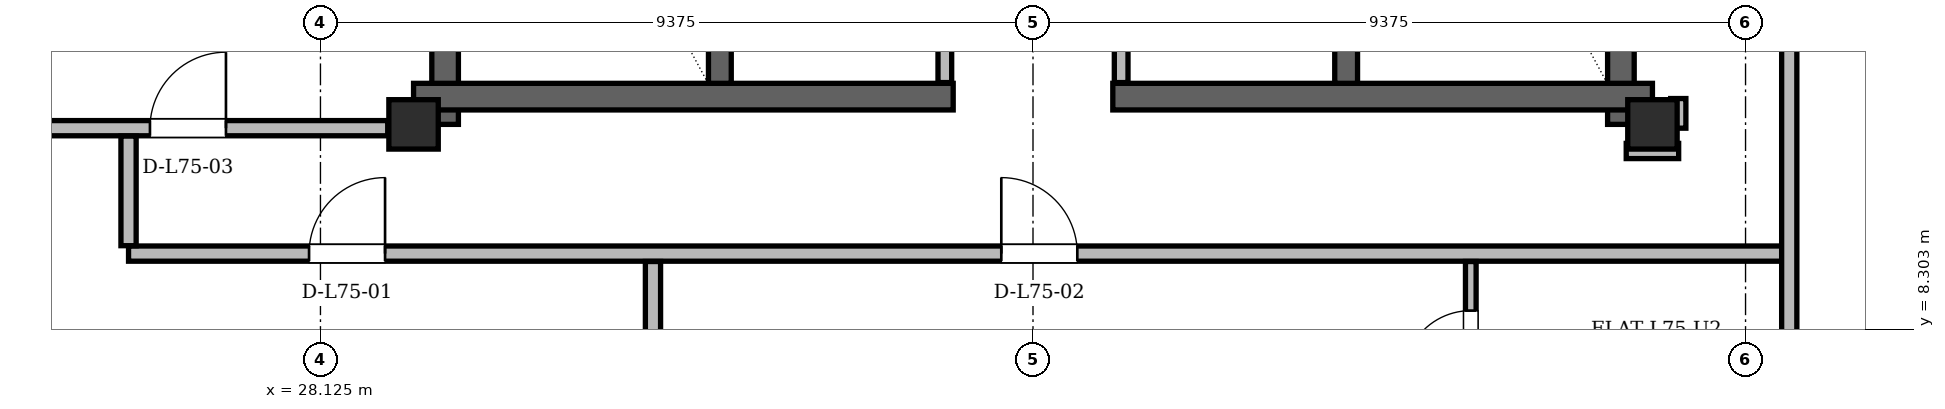
"""IFC4 building model, lengths in metres.
Left out: names, types, materials, properties, quantities, classifications, styles, units other than length and angle.
Written with IfcOpenShell. Run it as: python <this file> out.ifc"""

import sys

from ifc_helpers import new_model, si_unit, direction, frame, frame_2d, origin, origin_2d, place, context, subcontext, project, spatial, rectangle, hollow_rectangle, extrude, element, fill, save


model = new_model("IFC4")
c1 = context("Model", 3, precision=1e-05, world=origin(), true_north=direction((0.0, 1.0)))
c2 = subcontext(c1, "Body", "Model", "MODEL_VIEW")
j1 = project(units=[si_unit("LENGTHUNIT", "METRE"), si_unit("PLANEANGLEUNIT", "RADIAN")], contexts=[c1])
p1 = place(None, origin())
s1 = spatial("IfcSite", under=j1, at=p1, CompositionType="ELEMENT")
p2 = place(p1, origin())
s2 = spatial("IfcBuilding", under=s1, at=p2, CompositionType="ELEMENT")
p3 = place(p2, frame((0.0, 0.0, 285.0)))
s3 = spatial("IfcBuildingStorey", under=s2, at=p3, CompositionType="ELEMENT", Elevation=285.0)
for number, where, z_axis, x_axis in (
    (1, (29.35, 11.0, 0.0), (0.0, 0.0, 1.0), (1.0, 0.0, 0.0)),
    (2, (45.65, 11.0, 0.0), (0.0, 0.0, 1.0), (1.0, 0.0, 0.0)),
):
    element("IfcColumn", number, at=place(p3, frame(where, z_axis=z_axis, x_axis=x_axis)), inside=s3, PredefinedType="COLUMN", context=c2, shape_type="SweptSolid", body=[
        extrude(hollow_rectangle(XDim=0.65, YDim=0.65, WallThickness=0.05, at=origin_2d()), origin(), (0.0, 0.0, 1.0), 3.9),
    ])
for number, where, z_axis, x_axis in (
    (3, (29.765, 11.0, 0.0), (0.0, 0.0, 1.0), (0.0, 1.0, 0.0)),
    (4, (45.235, 11.0, 0.0), (0.0, 0.0, 1.0), (0.0, 1.0, 0.0)),
):
    element("IfcWall", number, at=place(p3, frame(where, z_axis=z_axis, x_axis=x_axis)), inside=s3, PredefinedType="SHEAR", context=c2, shape_type="SweptSolid", body=[
        extrude(rectangle(XDim=13.3, YDim=0.35, at=frame_2d((6.65, 0.0))), origin(), (0.0, 0.0, 1.0), 3.68),
    ])
for number, where, z_axis, x_axis in (
    (5, (29.35, 11.365, 0.0), (0.0, 0.0, 1.0), (1.0, 0.0, 0.0)),
    (6, (38.55, 11.365, 0.0), (0.0, 0.0, 1.0), (1.0, 0.0, 0.0)),
):
    element("IfcWall", number, at=place(p3, frame(where, z_axis=z_axis, x_axis=x_axis)), inside=s3, PredefinedType="SHEAR", context=c2, shape_type="SweptSolid", body=[
        extrude(rectangle(XDim=7.1, YDim=0.35, at=frame_2d((3.55, 0.0))), origin(), (0.0, 0.0, 1.0), 3.68),
    ])
for number, where, z_axis, x_axis in (
    (7, (33.38, 11.54, 0.0), (0.0, 0.0, 1.0), (0.0, 1.0, 0.0)),
    (8, (41.62, 11.54, 0.0), (0.0, 0.0, 1.0), (0.0, 1.0, 0.0)),
):
    element("IfcWall", number, at=place(p3, frame(where, z_axis=z_axis, x_axis=x_axis)), inside=s3, PredefinedType="SHEAR", context=c2, shape_type="SweptSolid", body=[
        extrude(rectangle(XDim=7.62, YDim=0.3, at=frame_2d((3.81, 0.0))), origin(), (0.0, 0.0, 1.0), 3.68),
    ])
p4 = place(p3, frame((58.415, 10.535, 0.0), z_axis=(0.0, 0.0, 1.0), x_axis=(-0.499999864727, 0.866025481884, 0.0)))
e9 = element("IfcWall", 9, at=p4, inside=s3, PredefinedType="SOLIDWALL", context=c2, shape_type="SweptSolid", body=[
    extrude(rectangle(XDim=37.481, YDim=0.29, at=frame_2d((18.74, 0.0))), origin(), (0.0, 0.0, 1.0), 3.058),
])
p5 = place(p4, frame((7.504, 0.0, 0.0)))
e10 = element("IfcOpeningElement", 10, at=p5, cuts=e9, PredefinedType="OPENING", context=c2, shape_type="SweptSolid", body=[
    extrude(rectangle(XDim=1.3, YDim=2.2, at=frame_2d((0.65, 1.1))), frame((0.0, 0.145, 0.0), z_axis=(0.0, -1.0, 0.0), x_axis=(1.0, 0.0, 0.0)), (0.0, 0.0, 1.0), 0.29),
])
p6 = place(p4, frame((32.341, 0.0, 0.0)))
e11 = element("IfcOpeningElement", 11, at=p6, cuts=e9, PredefinedType="OPENING", context=c2, shape_type="SweptSolid", body=[
    extrude(rectangle(XDim=1.5, YDim=2.2, at=frame_2d((0.75, 1.1))), frame((0.0, 0.145, 0.0), z_axis=(0.0, -1.0, 0.0), x_axis=(1.0, 0.0, 0.0)), (0.0, 0.0, 1.0), 0.29),
])
p7 = place(p4, frame((12.54, 0.0, 0.85)))
e12 = element("IfcOpeningElement", 12, at=p7, cuts=e9, PredefinedType="OPENING", context=c2, shape_type="SweptSolid", body=[
    extrude(rectangle(XDim=1.4, YDim=1.6, at=frame_2d((0.7, 0.8))), frame((0.0, 0.145, 0.0), z_axis=(0.0, -1.0, 0.0), x_axis=(1.0, 0.0, 0.0)), (0.0, 0.0, 1.0), 0.29),
])
p8 = place(p4, frame((17.705, 0.0, 0.85)))
e13 = element("IfcOpeningElement", 13, at=p8, cuts=e9, PredefinedType="OPENING", context=c2, shape_type="SweptSolid", body=[
    extrude(rectangle(XDim=2.5, YDim=2.098, at=frame_2d((1.25, 1.049))), frame((0.0, 0.145, 0.0), z_axis=(0.0, -1.0, 0.0), x_axis=(1.0, 0.0, 0.0)), (0.0, 0.0, 1.0), 0.29),
])
p9 = place(p4, frame((2.467, 0.0, 0.85)))
e14 = element("IfcOpeningElement", 14, at=p9, cuts=e9, PredefinedType="OPENING", context=c2, shape_type="SweptSolid", body=[
    extrude(rectangle(XDim=2.5, YDim=2.098, at=frame_2d((1.25, 1.049))), frame((0.0, 0.145, 0.0), z_axis=(0.0, -1.0, 0.0), x_axis=(1.0, 0.0, 0.0)), (0.0, 0.0, 1.0), 0.29),
])
p10 = place(p4, frame((27.081, 0.0, 0.85)))
e15 = element("IfcOpeningElement", 15, at=p10, cuts=e9, PredefinedType="OPENING", context=c2, shape_type="SweptSolid", body=[
    extrude(rectangle(XDim=1.2, YDim=1.48, at=frame_2d((0.6, 0.74))), frame((0.0, 0.145, 0.0), z_axis=(0.0, -1.0, 0.0), x_axis=(1.0, 0.0, 0.0)), (0.0, 0.0, 1.0), 0.29),
])
p11 = place(p4, frame((34.388, 0.0, 0.85)))
e16 = element("IfcOpeningElement", 16, at=p11, cuts=e9, PredefinedType="OPENING", context=c2, shape_type="SweptSolid", body=[
    extrude(rectangle(XDim=1.8, YDim=1.75, at=frame_2d((0.9, 0.875))), frame((0.0, 0.145, 0.0), z_axis=(0.0, -1.0, 0.0), x_axis=(1.0, 0.0, 0.0)), (0.0, 0.0, 1.0), 0.29),
])
p12 = place(p4, frame((22.312, 0.0, 0.85)))
e17 = element("IfcOpeningElement", 17, at=p12, cuts=e9, PredefinedType="OPENING", context=c2, shape_type="SweptSolid", body=[
    extrude(rectangle(XDim=1.2, YDim=1.48, at=frame_2d((0.6, 0.74))), frame((0.0, 0.145, 0.0), z_axis=(0.0, -1.0, 0.0), x_axis=(1.0, 0.0, 0.0)), (0.0, 0.0, 1.0), 0.29),
])
p13 = place(p3, frame((35.326, 42.995, 0.0), z_axis=(0.0, 0.0, 1.0), x_axis=(-0.499999864727, -0.866025481884, 0.0)))
e18 = element("IfcWall", 18, at=p13, inside=s3, PredefinedType="SOLIDWALL", context=c2, shape_type="SweptSolid", body=[
    extrude(rectangle(XDim=37.481, YDim=0.29, at=frame_2d((18.74, 0.0))), origin(), (0.0, 0.0, 1.0), 3.058),
])
p14 = place(p13, frame((8.034, 0.0, 0.0)))
e19 = element("IfcOpeningElement", 19, at=p14, cuts=e18, PredefinedType="OPENING", context=c2, shape_type="SweptSolid", body=[
    extrude(rectangle(XDim=1.5, YDim=2.2, at=frame_2d((0.75, 1.1))), frame((0.0, 0.145, 0.0), z_axis=(0.0, -1.0, 0.0), x_axis=(1.0, 0.0, 0.0)), (0.0, 0.0, 1.0), 0.29),
])
p15 = place(p13, frame((32.341, 0.0, 0.0)))
e20 = element("IfcOpeningElement", 20, at=p15, cuts=e18, PredefinedType="OPENING", context=c2, shape_type="SweptSolid", body=[
    extrude(rectangle(XDim=1.5, YDim=2.2, at=frame_2d((0.75, 1.1))), frame((0.0, 0.145, 0.0), z_axis=(0.0, -1.0, 0.0), x_axis=(1.0, 0.0, 0.0)), (0.0, 0.0, 1.0), 0.29),
])
p16 = place(p13, frame((35.454, 0.0, 0.85)))
e21 = element("IfcOpeningElement", 21, at=p16, cuts=e18, PredefinedType="OPENING", context=c2, shape_type="SweptSolid", body=[
    extrude(rectangle(XDim=1.2, YDim=1.48, at=frame_2d((0.6, 0.74))), frame((0.0, 0.145, 0.0), z_axis=(0.0, -1.0, 0.0), x_axis=(1.0, 0.0, 0.0)), (0.0, 0.0, 1.0), 0.29),
])
p17 = place(p13, frame((27.367, 0.0, 0.85)))
e22 = element("IfcOpeningElement", 22, at=p17, cuts=e18, PredefinedType="OPENING", context=c2, shape_type="SweptSolid", body=[
    extrude(rectangle(XDim=1.8, YDim=1.75, at=frame_2d((0.9, 0.875))), frame((0.0, 0.145, 0.0), z_axis=(0.0, -1.0, 0.0), x_axis=(1.0, 0.0, 0.0)), (0.0, 0.0, 1.0), 0.29),
])
p18 = place(p13, frame((21.75, 0.0, 0.85)))
e23 = element("IfcOpeningElement", 23, at=p18, cuts=e18, PredefinedType="OPENING", context=c2, shape_type="SweptSolid", body=[
    extrude(rectangle(XDim=1.6, YDim=1.7, at=frame_2d((0.8, 0.85))), frame((0.0, 0.145, 0.0), z_axis=(0.0, -1.0, 0.0), x_axis=(1.0, 0.0, 0.0)), (0.0, 0.0, 1.0), 0.29),
])
p19 = place(p13, frame((16.51, 0.0, 0.85)))
e24 = element("IfcOpeningElement", 24, at=p19, cuts=e18, PredefinedType="OPENING", context=c2, shape_type="SweptSolid", body=[
    extrude(rectangle(XDim=1.8, YDim=1.75, at=frame_2d((0.9, 0.875))), frame((0.0, 0.145, 0.0), z_axis=(0.0, -1.0, 0.0), x_axis=(1.0, 0.0, 0.0)), (0.0, 0.0, 1.0), 0.29),
])
p20 = place(p13, frame((3.652, 0.0, 0.85)))
e25 = element("IfcOpeningElement", 25, at=p20, cuts=e18, PredefinedType="OPENING", context=c2, shape_type="SweptSolid", body=[
    extrude(rectangle(XDim=1.2, YDim=1.48, at=frame_2d((0.6, 0.74))), frame((0.0, 0.145, 0.0), z_axis=(0.0, -1.0, 0.0), x_axis=(1.0, 0.0, 0.0)), (0.0, 0.0, 1.0), 0.29),
])
p21 = place(p13, frame((1.094, 0.0, 0.85)))
e26 = element("IfcOpeningElement", 26, at=p21, cuts=e18, PredefinedType="OPENING", context=c2, shape_type="SweptSolid", body=[
    extrude(rectangle(XDim=1.2, YDim=1.48, at=frame_2d((0.6, 0.74))), frame((0.0, 0.145, 0.0), z_axis=(0.0, -1.0, 0.0), x_axis=(1.0, 0.0, 0.0)), (0.0, 0.0, 1.0), 0.29),
])
p22 = place(p3, frame((36.34, 11.55, 0.0), z_axis=(0.0, 0.0, 1.0), x_axis=(0.0, 1.0, 0.0)))
e27 = element("IfcWall", 27, at=p22, inside=s3, PredefinedType="PARTITIONING", context=c2, shape_type="SweptSolid", body=[
    extrude(rectangle(XDim=5.55, YDim=0.18, at=frame_2d((2.775, 0.0))), origin(), (0.0, 0.0, 1.0), 3.68),
])
p23 = place(p22, frame((2.85, 0.0, 0.0)))
e28 = element("IfcOpeningElement", 28, at=p23, cuts=e27, PredefinedType="OPENING", context=c2, shape_type="SweptSolid", body=[
    extrude(rectangle(XDim=0.95, YDim=2.1, at=frame_2d((0.475, 1.05))), frame((0.0, 0.09, 0.0), z_axis=(0.0, -1.0, 0.0), x_axis=(1.0, 0.0, 0.0)), (0.0, 0.0, 1.0), 0.18),
])
p24 = place(p3, frame((38.66, 11.55, 0.0), z_axis=(0.0, 0.0, 1.0), x_axis=(0.0, 1.0, 0.0)))
e29 = element("IfcWall", 29, at=p24, inside=s3, PredefinedType="PARTITIONING", context=c2, shape_type="SweptSolid", body=[
    extrude(rectangle(XDim=5.55, YDim=0.18, at=frame_2d((2.775, 0.0))), origin(), (0.0, 0.0, 1.0), 3.68),
])
p25 = place(p24, frame((2.0, 0.0, 0.0)))
e30 = element("IfcOpeningElement", 30, at=p25, cuts=e29, PredefinedType="OPENING", context=c2, shape_type="SweptSolid", body=[
    extrude(rectangle(XDim=0.95, YDim=2.1, at=frame_2d((0.475, 1.05))), frame((0.0, 0.09, 0.0), z_axis=(0.0, -1.0, 0.0), x_axis=(1.0, 0.0, 0.0)), (0.0, 0.0, 1.0), 0.18),
])
p26 = place(p3, frame((25.6, 9.3, 0.0), z_axis=(0.0, 0.0, 1.0), x_axis=(1.0, 0.0, 0.0)))
e31 = element("IfcWall", 31, at=p26, inside=s3, PredefinedType="PARTITIONING", context=c2, shape_type="SweptSolid", body=[
    extrude(rectangle(XDim=21.85, YDim=0.2, at=frame_2d((10.925, 0.0))), origin(), (0.0, 0.0, 1.0), 3.68),
])
p27 = place(p26, frame((2.375, 0.0, 0.0)))
e32 = element("IfcOpeningElement", 32, at=p27, cuts=e31, PredefinedType="OPENING", context=c2, shape_type="SweptSolid", body=[
    extrude(rectangle(XDim=1.0, YDim=2.18, at=frame_2d((0.5, 1.09))), frame((0.0, 0.1, 0.0), z_axis=(0.0, -1.0, 0.0), x_axis=(1.0, 0.0, 0.0)), (0.0, 0.0, 1.0), 0.2),
])
p28 = place(p26, frame((11.483, 0.0, 0.0)))
e33 = element("IfcOpeningElement", 33, at=p28, cuts=e31, PredefinedType="OPENING", context=c2, shape_type="SweptSolid", body=[
    extrude(rectangle(XDim=1.0, YDim=2.18, at=frame_2d((0.5, 1.09))), frame((0.0, 0.1, 0.0), z_axis=(0.0, -1.0, 0.0), x_axis=(1.0, 0.0, 0.0)), (0.0, 0.0, 1.0), 0.2),
])
p29 = place(p3, frame((45.305, 10.65, 0.0), z_axis=(0.0, 0.0, 1.0), x_axis=(1.0, 0.0, 0.0)))
e34 = element("IfcWall", 34, at=p29, inside=s3, PredefinedType="PARTITIONING", context=c2, shape_type="SweptSolid", body=[
    extrude(rectangle(XDim=0.69, YDim=0.2, at=frame_2d((0.345, 0.0))), origin(), (0.0, 0.0, 1.0), 3.68),
])
p30 = place(p3, frame((16.997, 10.95, 0.0), z_axis=(0.0, 0.0, 1.0), x_axis=(1.0, 0.0, 0.0)))
e35 = element("IfcWall", 35, at=p30, inside=s3, PredefinedType="PARTITIONING", context=c2, shape_type="SweptSolid", body=[
    extrude(rectangle(XDim=12.013, YDim=0.2, at=frame_2d((6.007, 0.0))), origin(), (0.0, 0.0, 1.0), 3.266),
])
p31 = place(p30, frame((8.885, 0.0, 0.0)))
e36 = element("IfcOpeningElement", 36, at=p31, cuts=e35, PredefinedType="OPENING", context=c2, shape_type="SweptSolid", body=[
    extrude(rectangle(XDim=1.0, YDim=2.18, at=frame_2d((0.5, 1.09))), frame((0.0, 0.1, 0.0), z_axis=(0.0, -1.0, 0.0), x_axis=(1.0, 0.0, 0.0)), (0.0, 0.0, 1.0), 0.2),
])
p32 = place(p3, frame((25.6, 9.404, 0.0), z_axis=(0.0, 0.0, 1.0), x_axis=(0.0, 1.0, 0.0)))
e37 = element("IfcWall", 37, at=p32, inside=s3, PredefinedType="PARTITIONING", context=c2, shape_type="SweptSolid", body=[
    extrude(rectangle(XDim=1.442, YDim=0.2, at=frame_2d((0.721, 0.0))), origin(), (0.0, 0.0, 1.0), 3.266),
])
p33 = place(p3, frame((32.5, 6.919, 0.0), z_axis=(0.0, 0.0, 1.0), x_axis=(0.0, 1.0, 0.0)))
e38 = element("IfcWall", 38, at=p33, inside=s3, PredefinedType="PARTITIONING", context=c2, shape_type="SweptSolid", body=[
    extrude(rectangle(XDim=2.277, YDim=0.2, at=frame_2d((1.139, 0.0))), origin(), (0.0, 0.0, 1.0), 3.68),
])
p34 = place(p3, frame((43.26, 6.919, 0.0), z_axis=(0.0, 0.0, 1.0), x_axis=(0.0, 1.0, 0.0)))
e39 = element("IfcWall", 39, at=p34, inside=s3, PredefinedType="PARTITIONING", context=c2, shape_type="SweptSolid", body=[
    extrude(rectangle(XDim=2.277, YDim=0.14, at=frame_2d((1.139, 0.0))), origin(), (0.0, 0.0, 1.0), 3.68),
])
p35 = place(p34, frame((0.751, 0.0, 0.0)))
e40 = element("IfcOpeningElement", 40, at=p35, cuts=e39, PredefinedType="OPENING", context=c2, shape_type="SweptSolid", body=[
    extrude(rectangle(XDim=0.88, YDim=2.08, at=frame_2d((0.44, 1.04))), frame((0.0, 0.07, 0.0), z_axis=(0.0, -1.0, 0.0), x_axis=(1.0, 0.0, 0.0)), (0.0, 0.0, 1.0), 0.14),
])
p36 = place(p3, frame((45.99, 10.95, 0.0), z_axis=(0.0, 0.0, 1.0), x_axis=(0.0, 1.0, 0.0)))
e41 = element("IfcWall", 41, at=p36, inside=s3, PredefinedType="PARTITIONING", context=c2, shape_type="SweptSolid", body=[
    extrude(rectangle(XDim=0.39, YDim=0.2, at=frame_2d((0.195, 0.0))), origin(), (0.0, 0.0, 1.0), 3.68),
])
p37 = place(p3, frame((47.45, 6.919, 0.0), z_axis=(0.0, 0.0, 1.0), x_axis=(0.0, 1.0, 0.0)))
e42 = element("IfcWall", 42, at=p37, inside=s3, PredefinedType="PARTITIONING", context=c2, shape_type="SweptSolid", body=[
    extrude(rectangle(XDim=22.31, YDim=0.2, at=frame_2d((11.155, 0.0))), origin(), (0.0, 0.0, 1.0), 3.058),
])
p38 = place(p37, frame((10.142, 0.0, 0.0)))
e43 = element("IfcOpeningElement", 43, at=p38, cuts=e42, PredefinedType="OPENING", context=c2, shape_type="SweptSolid", body=[
    extrude(rectangle(XDim=1.0, YDim=2.18, at=frame_2d((0.5, 1.09))), frame((0.0, 0.1, 0.0), z_axis=(0.0, -1.0, 0.0), x_axis=(1.0, 0.0, 0.0)), (0.0, 0.0, 1.0), 0.2),
])
p39 = place(p27, origin())
e44 = element("IfcDoor", 44, at=p39, inside=s3, OperationType="SINGLE_SWING_RIGHT", PredefinedType="DOOR", context=c2, shape_type="SweptSolid", body=[
    extrude(rectangle(XDim=1.0, YDim=2.18, at=frame_2d((0.5, 1.09))), frame((0.0, 0.025, 0.0), z_axis=(0.0, -1.0, 0.0), x_axis=(1.0, 0.0, 0.0)), (0.0, 0.0, 1.0), 0.05),
])
fill(e32, e44)
p40 = place(p28, origin())
e45 = element("IfcDoor", 45, at=p40, inside=s3, OperationType="SINGLE_SWING_LEFT", PredefinedType="DOOR", context=c2, shape_type="SweptSolid", body=[
    extrude(rectangle(XDim=1.0, YDim=2.18, at=frame_2d((0.5, 1.09))), frame((0.0, 0.025, 0.0), z_axis=(0.0, -1.0, 0.0), x_axis=(1.0, 0.0, 0.0)), (0.0, 0.0, 1.0), 0.05),
])
fill(e33, e45)
p41 = place(p31, origin())
e46 = element("IfcDoor", 46, at=p41, inside=s3, OperationType="SINGLE_SWING_RIGHT", PredefinedType="DOOR", context=c2, shape_type="SweptSolid", body=[
    extrude(rectangle(XDim=1.0, YDim=2.18, at=frame_2d((0.5, 1.09))), frame((0.0, 0.025, 0.0), z_axis=(0.0, -1.0, 0.0), x_axis=(1.0, 0.0, 0.0)), (0.0, 0.0, 1.0), 0.05),
])
fill(e36, e46)
p42 = place(p35, origin())
e47 = element("IfcDoor", 47, at=p42, inside=s3, OperationType="SINGLE_SWING_LEFT", PredefinedType="DOOR", context=c2, shape_type="SweptSolid", body=[
    extrude(rectangle(XDim=0.88, YDim=2.08, at=frame_2d((0.44, 1.04))), frame((0.0, 0.025, 0.0), z_axis=(0.0, -1.0, 0.0), x_axis=(1.0, 0.0, 0.0)), (0.0, 0.0, 1.0), 0.05),
])
fill(e40, e47)
save(model, sys.argv[1])
